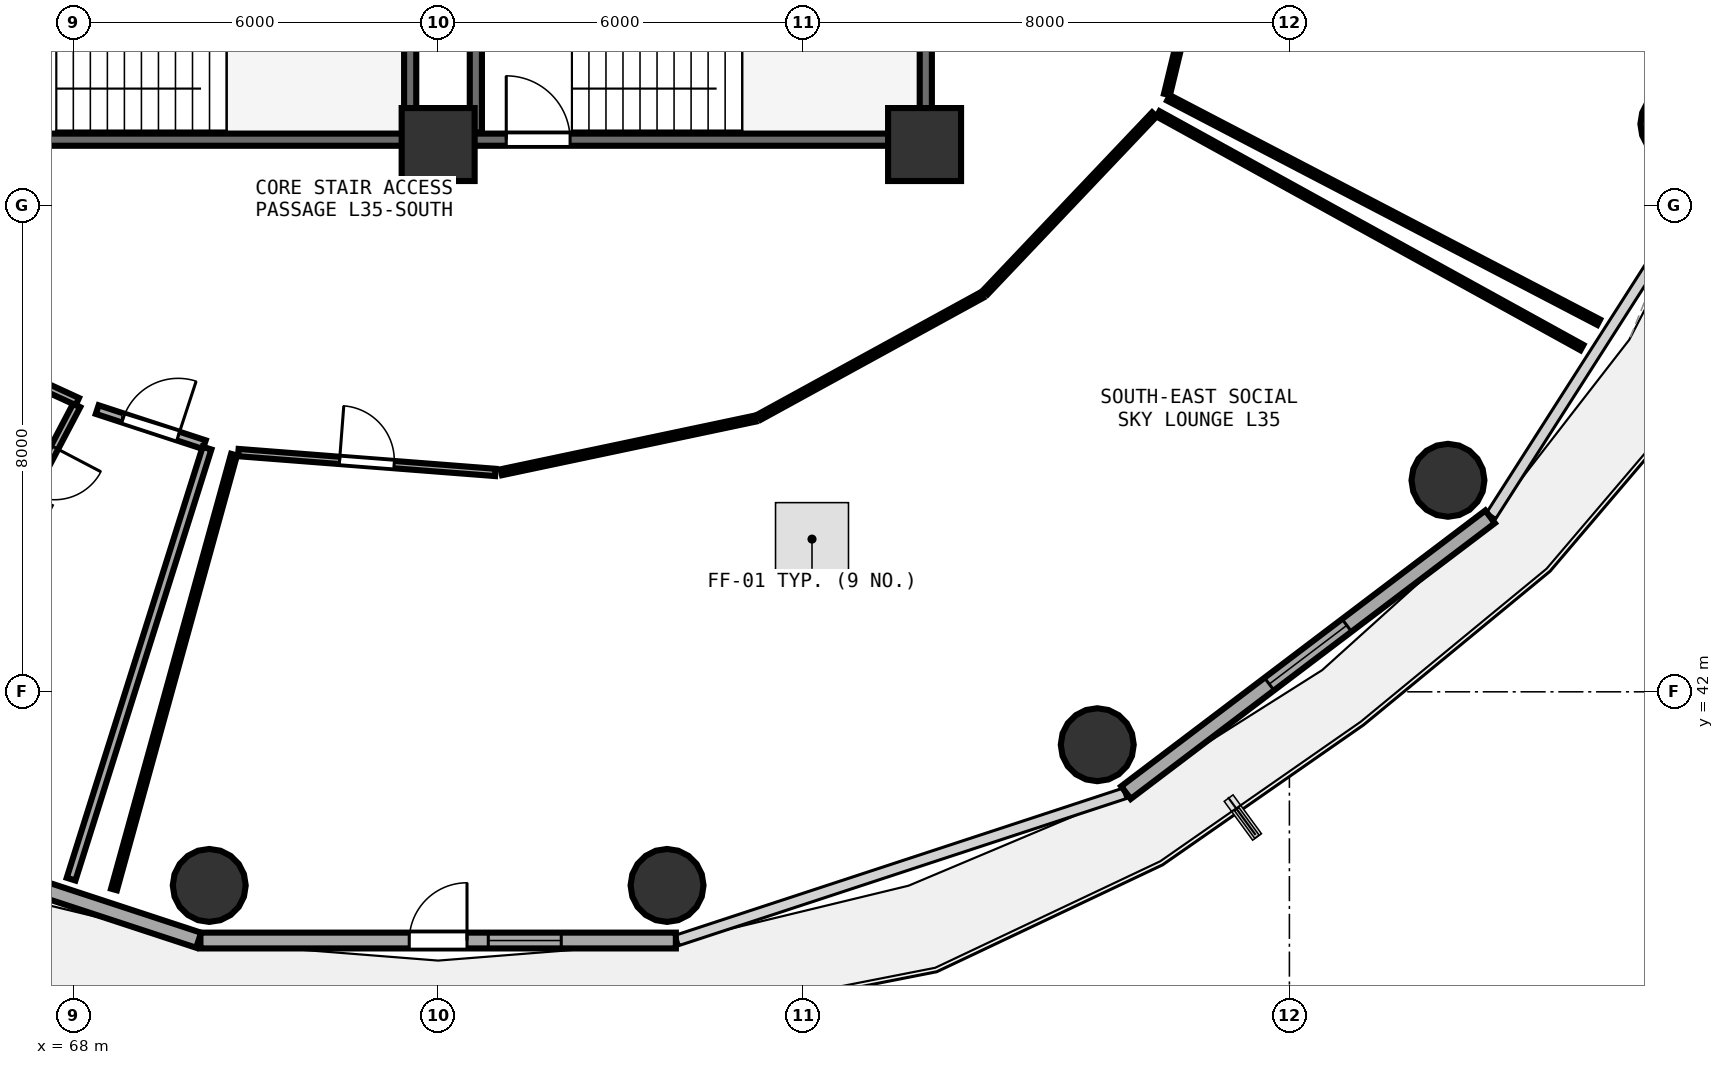
"""IFC4 building model, lengths in metres.
Left out: names, types, materials, properties, quantities, classifications, styles, units other than length and angle.
Written with IfcOpenShell. Run it as: python <this file> out.ifc"""

import sys

from ifc_helpers import new_model, si_unit, direction, frame, frame_2d, origin, origin_2d, place, context, subcontext, project, spatial, rectangle, circle, extrude, element, fill, save


model = new_model("IFC4")
c1 = context("Model", 3, precision=1e-05, world=origin(), true_north=direction((0.0, 1.0)))
c2 = subcontext(c1, "Body", "Model", "MODEL_VIEW")
j1 = project(units=[si_unit("LENGTHUNIT", "METRE"), si_unit("PLANEANGLEUNIT", "RADIAN")], contexts=[c1])
p1 = place(None, origin())
s1 = spatial("IfcSite", under=j1, at=p1, CompositionType="ELEMENT")
p2 = place(p1, origin())
s2 = spatial("IfcBuilding", under=s1, at=p2, CompositionType="ELEMENT")
p3 = place(p2, frame((0.0, 0.0, 139.35)))
s3 = spatial("IfcBuildingStorey", under=s2, at=p3, CompositionType="ELEMENT", Elevation=139.35)
for number, where, z_axis, x_axis in (
    (1, (74.0, 51.0, 0.0), (0.0, 0.0, 1.0), (1.0, 0.0, 0.0)),
    (2, (82.0, 51.0, 0.0), (0.0, 0.0, 1.0), (1.0, 0.0, 0.0)),
):
    element("IfcColumn", number, at=place(p3, frame(where, z_axis=z_axis, x_axis=x_axis)), inside=s3, PredefinedType="PILASTER", context=c2, shape_type="SweptSolid", body=[
        extrude(rectangle(XDim=1.2, YDim=1.2, at=origin_2d()), origin(), (0.0, 0.0, 1.0), 3.75),
    ])
for number, where, z_axis, x_axis in (
    (3, (70.235, 38.816, 0.0), (0.0, 0.0, 1.0), (1.0, 0.0, 0.0)),
    (4, (77.765, 38.816, 0.0), (0.0, 0.0, 1.0), (1.0, 0.0, 0.0)),
    (5, (84.84, 41.13, 0.0), (0.0, 0.0, 1.0), (1.0, 0.0, 0.0)),
    (6, (90.608, 45.479, 0.0), (0.0, 0.0, 1.0), (1.0, 0.0, 0.0)),
    (7, (94.373, 51.337, 0.0), (0.0, 0.0, 1.0), (1.0, 0.0, 0.0)),
):
    element("IfcColumn", number, at=place(p3, frame(where, z_axis=z_axis, x_axis=x_axis)), inside=s3, PredefinedType="COLUMN", context=c2, shape_type="SweptSolid", body=[
        extrude(circle(Radius=0.6, at=origin_2d()), origin(), (0.0, 0.0, 1.0), 3.75),
    ])
p4 = place(p3, frame((62.714, 40.328, 0.0), z_axis=(0.0, 0.0, 1.0), x_axis=(0.950038302428, -0.312133343173, 0.0)))
e8 = element("IfcWall", 8, at=p4, inside=s3, PredefinedType="SOLIDWALL", context=c2, shape_type="SweptSolid", body=[
    extrude(rectangle(XDim=7.733, YDim=0.26, at=frame_2d((3.867, 0.0))), origin(), (0.0, 0.0, 1.0), 3.475),
])
p5 = place(p4, frame((3.067, 0.0, 0.85)))
e9 = element("IfcOpeningElement", 9, at=p5, cuts=e8, PredefinedType="OPENING", context=c2, shape_type="SweptSolid", body=[
    extrude(rectangle(XDim=1.6, YDim=1.45, at=frame_2d((0.8, 0.725))), frame((0.0, 0.14, 0.0), z_axis=(0.0, -1.0, 0.0), x_axis=(1.0, 0.0, 0.0)), (0.0, 0.0, 1.0), 0.28),
])
p6 = place(p3, frame((70.091, 37.91, 0.0), z_axis=(0.0, 0.0, 1.0), x_axis=(1.0, 0.0, 0.0)))
e10 = element("IfcWall", 10, at=p6, inside=s3, PredefinedType="SOLIDWALL", context=c2, shape_type="SweptSolid", body=[
    extrude(rectangle(XDim=7.819, YDim=0.26, at=frame_2d((3.909, 0.0))), origin(), (0.0, 0.0, 1.0), 3.475),
])
p7 = place(p6, frame((3.434, 0.0, 0.0)))
e11 = element("IfcOpeningElement", 11, at=p7, cuts=e10, PredefinedType="OPENING", context=c2, shape_type="SweptSolid", body=[
    extrude(rectangle(XDim=0.95, YDim=2.1, at=frame_2d((0.475, 1.05))), frame((0.0, 0.14, 0.0), z_axis=(0.0, -1.0, 0.0), x_axis=(1.0, 0.0, 0.0)), (0.0, 0.0, 1.0), 0.28),
])
p8 = place(p6, frame((4.734, 0.0, 0.85)))
e12 = element("IfcOpeningElement", 12, at=p8, cuts=e10, PredefinedType="OPENING", context=c2, shape_type="SweptSolid", body=[
    extrude(rectangle(XDim=1.2, YDim=1.45, at=frame_2d((0.6, 0.725))), frame((0.0, 0.14, 0.0), z_axis=(0.0, -1.0, 0.0), x_axis=(1.0, 0.0, 0.0)), (0.0, 0.0, 1.0), 0.28),
])
p9 = place(p3, frame((85.312, 40.342, 0.0), z_axis=(0.0, 0.0, 1.0), x_axis=(0.797163719609, 0.603763202042, 0.0)))
e13 = element("IfcWall", 13, at=p9, inside=s3, PredefinedType="SOLIDWALL", context=c2, shape_type="SweptSolid", body=[
    extrude(rectangle(XDim=7.512, YDim=0.26, at=frame_2d((3.756, 0.0))), origin(), (0.0, 0.0, 1.0), 3.475),
])
p10 = place(p9, frame((2.956, 0.0, 0.85)))
e14 = element("IfcOpeningElement", 14, at=p10, cuts=e13, PredefinedType="OPENING", context=c2, shape_type="SweptSolid", body=[
    extrude(rectangle(XDim=1.6, YDim=1.45, at=frame_2d((0.8, 0.725))), frame((0.0, 0.14, 0.0), z_axis=(0.0, -1.0, 0.0), x_axis=(1.0, 0.0, 0.0)), (0.0, 0.0, 1.0), 0.28),
])
p11 = place(p3, frame((74.0, 51.08, 0.0), z_axis=(0.0, 0.0, 1.0), x_axis=(1.0, 0.0, 0.0)))
e15 = element("IfcWall", 15, at=p11, inside=s3, PredefinedType="SHEAR", context=c2, shape_type="SweptSolid", body=[
    extrude(rectangle(XDim=7.9, YDim=0.2, at=frame_2d((3.95, 0.0))), origin(), (0.0, 0.0, 1.0), 3.49),
])
p12 = place(p11, frame((1.12, 0.0, 0.0)))
e16 = element("IfcOpeningElement", 16, at=p12, cuts=e15, PredefinedType="OPENING", context=c2, shape_type="SweptSolid", body=[
    extrude(rectangle(XDim=1.05, YDim=2.1, at=frame_2d((0.525, 1.05))), frame((0.0, 0.11, 0.0), z_axis=(0.0, -1.0, 0.0), x_axis=(1.0, 0.0, 0.0)), (0.0, 0.0, 1.0), 0.22),
])
for number, where, z_axis, x_axis in (
    (17, (82.02, 51.2, 0.0), (0.0, 0.0, 1.0), (0.0, 1.0, 0.0)),
    (18, (74.62, 54.27, 0.0), (0.0, 0.0, 1.0), (0.0, -1.0, 0.0)),
):
    element("IfcWall", number, at=place(p3, frame(where, z_axis=z_axis, x_axis=x_axis)), inside=s3, PredefinedType="SHEAR", context=c2, shape_type="SweptSolid", body=[
        extrude(rectangle(XDim=3.07, YDim=0.2, at=frame_2d((1.535, 0.0))), origin(), (0.0, 0.0, 1.0), 3.49),
    ])
p13 = place(p3, frame((66.26, 51.08, 0.0), z_axis=(0.0, 0.0, 1.0), x_axis=(1.0, 0.0, 0.0)))
e19 = element("IfcWall", 19, at=p13, inside=s3, PredefinedType="SHEAR", context=c2, shape_type="SweptSolid", body=[
    extrude(rectangle(XDim=7.16, YDim=0.2, at=frame_2d((3.58, 0.0))), origin(), (0.0, 0.0, 1.0), 3.49),
])
p14 = place(p3, frame((73.54, 51.2, 0.0), z_axis=(0.0, 0.0, 1.0), x_axis=(0.0, 1.0, 0.0)))
e20 = element("IfcWall", 20, at=p14, inside=s3, PredefinedType="SHEAR", context=c2, shape_type="SweptSolid", body=[
    extrude(rectangle(XDim=3.07, YDim=0.2, at=frame_2d((1.535, 0.0))), origin(), (0.0, 0.0, 1.0), 3.49),
])
p15 = place(p3, frame((70.714, 45.934, 0.0), z_axis=(0.0, 0.0, 1.0), x_axis=(0.99702766625, -0.077044355613, 0.0)))
e21 = element("IfcWall", 21, at=p15, inside=s3, PredefinedType="PARTITIONING", context=c2, shape_type="SweptSolid", body=[
    extrude(rectangle(XDim=4.24, YDim=0.12, at=frame_2d((2.12, 0.0))), origin(), (0.0, 0.0, 1.0), 2.975),
])
p16 = place(p15, frame((1.67, 0.0, 0.0)))
e22 = element("IfcOpeningElement", 22, at=p16, cuts=e21, PredefinedType="OPENING", context=c2, shape_type="SweptSolid", body=[
    extrude(rectangle(XDim=0.9, YDim=2.08, at=frame_2d((0.45, 1.04))), frame((0.0, 0.07, 0.0), z_axis=(0.0, -1.0, 0.0), x_axis=(1.0, 0.0, 0.0)), (0.0, 0.0, 1.0), 0.14),
])
p17 = place(p3, frame((68.056, 46.712, 0.0), z_axis=(0.0, 0.0, 1.0), x_axis=(-0.464721454244, -0.885456927222, 0.0)))
e23 = element("IfcWall", 23, at=p17, inside=s3, PredefinedType="PLUMBINGWALL", context=c2, shape_type="SweptSolid", body=[
    extrude(rectangle(XDim=2.426, YDim=0.13, at=frame_2d((1.213, 0.0))), origin(), (0.0, 0.0, 1.0), 3.175),
])
p18 = place(p17, frame((0.783, 0.0, 0.0)))
e24 = element("IfcOpeningElement", 24, at=p18, cuts=e23, PredefinedType="OPENING", context=c2, shape_type="SweptSolid", body=[
    extrude(rectangle(XDim=0.86, YDim=2.05, at=frame_2d((0.43, 1.025))), frame((0.0, 0.075, 0.0), z_axis=(0.0, -1.0, 0.0), x_axis=(1.0, 0.0, 0.0)), (0.0, 0.0, 1.0), 0.15),
])
p19 = place(p3, frame((68.393, 46.641, 0.0), z_axis=(0.0, 0.0, 1.0), x_axis=(0.950343295829, -0.311203502668, 0.0)))
e25 = element("IfcWall", 25, at=p19, inside=s3, PredefinedType="PARTITIONING", context=c2, shape_type="SweptSolid", body=[
    extrude(rectangle(XDim=1.853, YDim=0.15, at=frame_2d((0.927, 0.0))), origin(), (0.0, 0.0, 1.0), 3.48),
])
p20 = place(p19, frame((0.451, 0.0, 0.0)))
e26 = element("IfcOpeningElement", 26, at=p20, cuts=e25, PredefinedType="OPENING", context=c2, shape_type="SweptSolid", body=[
    extrude(rectangle(XDim=0.95, YDim=2.08, at=frame_2d((0.475, 1.04))), frame((0.0, 0.085, 0.0), z_axis=(0.0, -1.0, 0.0), x_axis=(1.0, 0.0, 0.0)), (0.0, 0.0, 1.0), 0.17),
])
p21 = place(p3, frame((75.04, 45.611, 0.0), z_axis=(0.0, 0.0, 1.0), x_axis=(0.978421930287, 0.206616858785, 0.0)))
e27 = element("IfcWall", 27, at=p21, inside=s3, PredefinedType="PARTITIONING", context=c2, shape_type="SweptSolid", body=[
    extrude(rectangle(XDim=4.261, YDim=0.1, at=frame_2d((2.13, 0.0))), origin(), (0.0, 0.0, 1.0), 2.975),
])
p22 = place(p3, frame((79.283, 46.519, 0.0), z_axis=(0.0, 0.0, 1.0), x_axis=(0.876994001609, 0.480501322726, 0.0)))
e28 = element("IfcWall", 28, at=p22, inside=s3, PredefinedType="PARTITIONING", context=c2, shape_type="SweptSolid", body=[
    extrude(rectangle(XDim=4.167, YDim=0.1, at=frame_2d((2.084, 0.0))), origin(), (0.0, 0.0, 1.0), 2.975),
])
p23 = place(p3, frame((83.0, 48.57, 0.0), z_axis=(0.0, 0.0, 1.0), x_axis=(0.688528308603, 0.725209465088, 0.0)))
e29 = element("IfcWall", 29, at=p23, inside=s3, PredefinedType="PARTITIONING", context=c2, shape_type="SweptSolid", body=[
    extrude(rectangle(XDim=4.033, YDim=0.1, at=frame_2d((2.017, 0.0))), origin(), (0.0, 0.0, 1.0), 2.975),
])
p24 = place(p3, frame((85.84, 51.505, 0.0), z_axis=(0.0, 0.0, 1.0), x_axis=(0.875725262543, -0.482809760199, 0.0)))
e30 = element("IfcWall", 30, at=p24, inside=s3, PredefinedType="PARTITIONING", context=c2, shape_type="SweptSolid", body=[
    extrude(rectangle(XDim=7.96, YDim=0.1, at=frame_2d((3.98, 0.0))), origin(), (0.0, 0.0, 1.0), 2.975),
])
p25 = place(p3, frame((68.669, 38.75, 0.0), z_axis=(0.0, 0.0, 1.0), x_axis=(0.26617364863, 0.963925095002, 0.0)))
e31 = element("IfcWall", 31, at=p25, inside=s3, PredefinedType="PARTITIONING", context=c2, shape_type="SweptSolid", body=[
    extrude(rectangle(XDim=7.418, YDim=0.1, at=frame_2d((3.709, 0.0))), origin(), (0.0, 0.0, 1.0), 3.025),
])
p26 = place(p3, frame((85.986, 51.824, 0.0), z_axis=(0.0, 0.0, 1.0), x_axis=(0.234816749424, 0.972039656696, 0.0)))
e32 = element("IfcWall", 32, at=p26, inside=s3, PredefinedType="PARTITIONING", context=c2, shape_type="SweptSolid", body=[
    extrude(rectangle(XDim=7.539, YDim=0.1, at=frame_2d((3.77, 0.0))), origin(), (0.0, 0.0, 1.0), 2.975),
])
p27 = place(p3, frame((93.086, 48.079, 0.0), z_axis=(0.0, 0.0, 1.0), x_axis=(-0.886727770337, 0.462291965443, 0.0)))
e33 = element("IfcWall", 33, at=p27, inside=s3, PredefinedType="PARTITIONING", context=c2, shape_type="SweptSolid", body=[
    extrude(rectangle(XDim=7.978, YDim=0.1, at=frame_2d((3.989, 0.0))), origin(), (0.0, 0.0, 1.0), 2.975),
])
p28 = place(p3, frame((67.363, 47.096, 0.0), z_axis=(0.0, 0.0, 1.0), x_axis=(0.908835433781, -0.417154832531, 0.0)))
e34 = element("IfcWall", 34, at=p28, inside=s3, PredefinedType="PLUMBINGWALL", context=c2, shape_type="SweptSolid", body=[
    extrude(rectangle(XDim=0.773, YDim=0.13, at=frame_2d((0.387, 0.0))), origin(), (0.0, 0.0, 1.0), 3.235),
])
p29 = place(p3, frame((70.199, 46.008, 0.0), z_axis=(0.0, 0.0, 1.0), x_axis=(-0.300834252316, -0.953676440222, 0.0)))
e35 = element("IfcWall", 35, at=p29, inside=s3, PredefinedType="PARTITIONING", context=c2, shape_type="SweptSolid", body=[
    extrude(rectangle(XDim=7.433, YDim=0.15, at=frame_2d((3.716, 0.0))), origin(), (0.0, 0.0, 1.0), 3.025),
])
p30 = place(p7, frame((0.95, 0.0, 0.0), z_axis=(0.0, 0.0, 1.0), x_axis=(-1.0, 0.0, 0.0)))
e36 = element("IfcDoor", 36, at=p30, inside=s3, OperationType="SINGLE_SWING_LEFT", PredefinedType="DOOR", context=c2, shape_type="SweptSolid", body=[
    extrude(rectangle(XDim=0.95, YDim=2.1, at=frame_2d((0.475, 1.05))), frame((0.0, 0.025, 0.0), z_axis=(0.0, -1.0, 0.0), x_axis=(1.0, 0.0, 0.0)), (0.0, 0.0, 1.0), 0.05),
])
fill(e11, e36)
p31 = place(p8, origin())
e37 = element("IfcWindow", 37, at=p31, inside=s3, PartitioningType="SINGLE_PANEL", PredefinedType="WINDOW", context=c2, shape_type="SweptSolid", body=[
    extrude(rectangle(XDim=1.2, YDim=1.45, at=frame_2d((0.6, 0.725))), frame((0.0, 0.03, 0.0), z_axis=(0.0, -1.0, 0.0), x_axis=(1.0, 0.0, 0.0)), (0.0, 0.0, 1.0), 0.06),
])
fill(e12, e37)
p32 = place(p10, origin())
e38 = element("IfcWindow", 38, at=p32, inside=s3, PartitioningType="SINGLE_PANEL", PredefinedType="WINDOW", context=c2, shape_type="SweptSolid", body=[
    extrude(rectangle(XDim=1.6, YDim=1.45, at=frame_2d((0.8, 0.725))), frame((0.0, 0.03, 0.0), z_axis=(0.0, -1.0, 0.0), x_axis=(1.0, 0.0, 0.0)), (0.0, 0.0, 1.0), 0.06),
])
fill(e14, e38)
p33 = place(p12, origin())
e39 = element("IfcDoor", 39, at=p33, inside=s3, OperationType="SINGLE_SWING_LEFT", PredefinedType="DOOR", context=c2, shape_type="SweptSolid", body=[
    extrude(rectangle(XDim=1.05, YDim=2.1, at=frame_2d((0.525, 1.05))), frame((0.0, 0.025, 0.0), z_axis=(0.0, -1.0, 0.0), x_axis=(1.0, 0.0, 0.0)), (0.0, 0.0, 1.0), 0.05),
])
fill(e16, e39)
p34 = place(p16, origin())
e40 = element("IfcDoor", 40, at=p34, inside=s3, OperationType="SINGLE_SWING_LEFT", PredefinedType="DOOR", context=c2, shape_type="SweptSolid", body=[
    extrude(rectangle(XDim=0.9, YDim=2.08, at=frame_2d((0.45, 1.04))), frame((0.0, 0.025, 0.0), z_axis=(0.0, -1.0, 0.0), x_axis=(1.0, 0.0, 0.0)), (0.0, 0.0, 1.0), 0.05),
])
fill(e22, e40)
p35 = place(p18, origin())
e41 = element("IfcDoor", 41, at=p35, inside=s3, OperationType="SINGLE_SWING_LEFT", PredefinedType="DOOR", context=c2, shape_type="SweptSolid", body=[
    extrude(rectangle(XDim=0.86, YDim=2.05, at=frame_2d((0.43, 1.025))), frame((0.0, 0.025, 0.0), z_axis=(0.0, -1.0, 0.0), x_axis=(1.0, 0.0, 0.0)), (0.0, 0.0, 1.0), 0.05),
])
fill(e24, e41)
p36 = place(p20, origin())
e42 = element("IfcDoor", 42, at=p36, inside=s3, OperationType="SINGLE_SWING_RIGHT", PredefinedType="DOOR", context=c2, shape_type="SweptSolid", body=[
    extrude(rectangle(XDim=0.95, YDim=2.08, at=frame_2d((0.475, 1.04))), frame((0.0, 0.025, 0.0), z_axis=(0.0, -1.0, 0.0), x_axis=(1.0, 0.0, 0.0)), (0.0, 0.0, 1.0), 0.05),
])
fill(e26, e42)
save(model, sys.argv[1])
